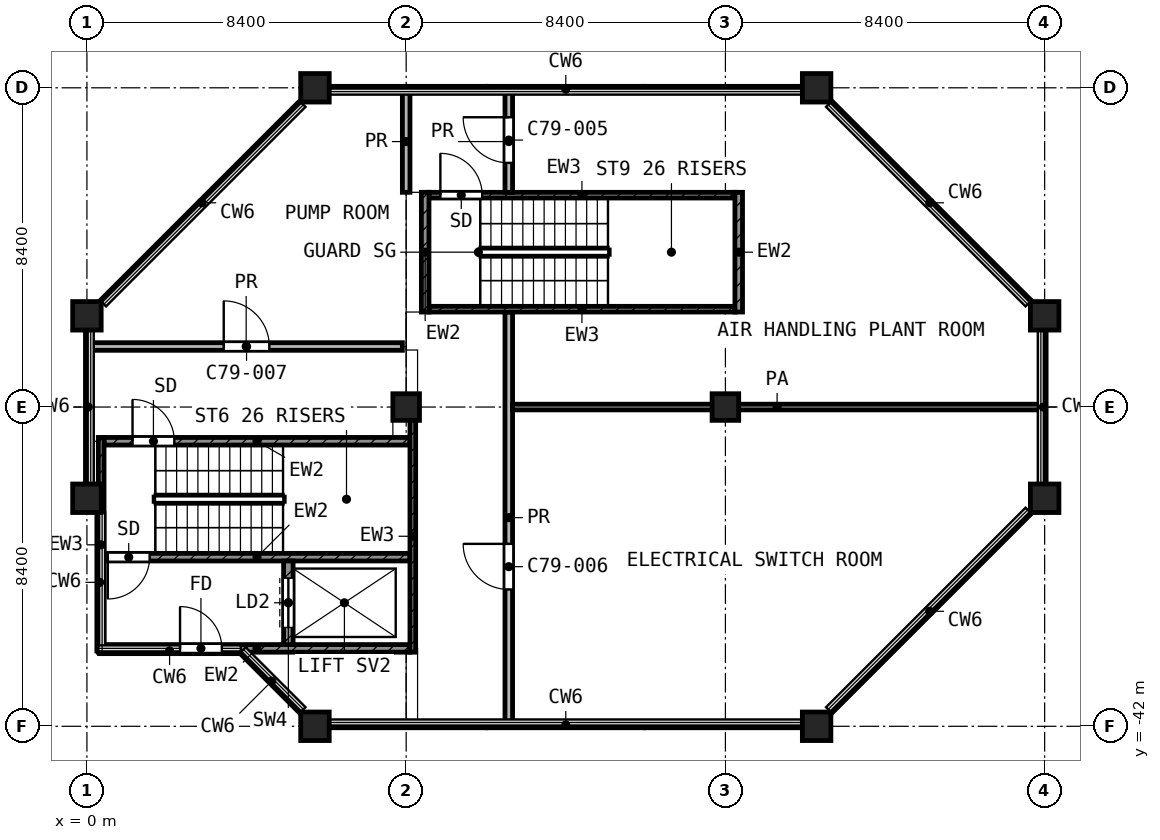
"""IFC4 building model, lengths in metres.
Left out: names, types, materials, properties, quantities, classifications, styles, units other than length and angle.
Written with IfcOpenShell. Run it as: python <this file> out.ifc"""

import sys

from ifc_helpers import new_model, si_unit, direction, frame, frame_2d, origin, origin_2d, place, context, subcontext, project, spatial, rectangle, extrude, element, fill, save


model = new_model("IFC4")
c1 = context("Model", 3, precision=1e-05, world=origin(), true_north=direction((0.0, 1.0)))
c2 = subcontext(c1, "Body", "Model", "MODEL_VIEW")
j1 = project(units=[si_unit("LENGTHUNIT", "METRE"), si_unit("PLANEANGLEUNIT", "RADIAN")], contexts=[c1])
p1 = place(None, origin())
s1 = spatial("IfcSite", under=j1, at=p1, CompositionType="ELEMENT")
p2 = place(p1, origin())
s2 = spatial("IfcBuilding", under=s1, at=p2, CompositionType="ELEMENT")
p3 = place(p2, frame((0.0, 0.0, 341.2)))
s3 = spatial("IfcBuildingStorey", under=s2, at=p3, CompositionType="ELEMENT", Elevation=341.2)
for number, where, z_axis, x_axis in (
    (1, (6.0, -25.2, 0.0), (0.0, 0.0, 1.0), (1.0, 0.0, 0.0)),
    (2, (19.2, -25.2, 0.0), (0.0, 0.0, 1.0), (1.0, 0.0, 0.0)),
    (3, (0.0, -31.2, 0.0), (0.0, 0.0, 1.0), (1.0, 0.0, 0.0)),
    (4, (25.2, -31.2, 0.0), (0.0, 0.0, 1.0), (1.0, 0.0, 0.0)),
):
    element("IfcColumn", number, at=place(p3, frame(where, z_axis=z_axis, x_axis=x_axis)), inside=s3, PredefinedType="COLUMN", context=c2, shape_type="SweptSolid", body=[
        extrude(rectangle(XDim=0.75, YDim=0.75, at=origin_2d()), origin(), (0.0, 0.0, 1.0), 4.5),
    ])
for number, where, z_axis, x_axis in (
    (5, (8.4, -33.6, 0.0), (0.0, 0.0, 1.0), (1.0, 0.0, 0.0)),
    (6, (16.8, -33.6, 0.0), (0.0, 0.0, 1.0), (1.0, 0.0, 0.0)),
):
    element("IfcColumn", number, at=place(p3, frame(where, z_axis=z_axis, x_axis=x_axis)), inside=s3, PredefinedType="COLUMN", context=c2, shape_type="SweptSolid", body=[
        extrude(rectangle(XDim=0.7, YDim=0.7, at=origin_2d()), origin(), (0.0, 0.0, 1.0), 4.5),
    ])
for number, where, z_axis, x_axis in (
    (7, (0.0, -36.0, 0.0), (0.0, 0.0, 1.0), (1.0, 0.0, 0.0)),
    (8, (25.2, -36.0, 0.0), (0.0, 0.0, 1.0), (1.0, 0.0, 0.0)),
    (9, (6.0, -42.0, 0.0), (0.0, 0.0, 1.0), (1.0, 0.0, 0.0)),
    (10, (19.2, -42.0, 0.0), (0.0, 0.0, 1.0), (1.0, 0.0, 0.0)),
):
    element("IfcColumn", number, at=place(p3, frame(where, z_axis=z_axis, x_axis=x_axis)), inside=s3, PredefinedType="COLUMN", context=c2, shape_type="SweptSolid", body=[
        extrude(rectangle(XDim=0.75, YDim=0.75, at=origin_2d()), origin(), (0.0, 0.0, 1.0), 4.5),
    ])
p4 = place(p3, frame((0.375, -40.05, 0.0), z_axis=(0.0, 0.0, 1.0), x_axis=(0.0, 1.0, 0.0)))
e11 = element("IfcWall", 11, at=p4, inside=s3, PredefinedType="SHEAR", context=c2, shape_type="SweptSolid", body=[
    extrude(rectangle(XDim=5.65, YDim=0.15, at=frame_2d((2.825, 0.0))), origin(), (0.0, 0.0, 1.0), 4.2),
])
p5 = place(p3, frame((8.575, -40.05, 0.0), z_axis=(0.0, 0.0, 1.0), x_axis=(0.0, 1.0, 0.0)))
e12 = element("IfcWall", 12, at=p5, inside=s3, PredefinedType="SHEAR", context=c2, shape_type="SweptSolid", body=[
    extrude(rectangle(XDim=6.1, YDim=0.15, at=frame_2d((3.05, 0.0))), origin(), (0.0, 0.0, 1.0), 4.2),
])
p6 = place(p3, frame((0.45, -34.5, 0.0), z_axis=(0.0, 0.0, 1.0), x_axis=(1.0, 0.0, 0.0)))
e13 = element("IfcWall", 13, at=p6, inside=s3, PredefinedType="SHEAR", context=c2, shape_type="SweptSolid", body=[
    extrude(rectangle(XDim=8.05, YDim=0.2, at=frame_2d((4.025, 0.0))), origin(), (0.0, 0.0, 1.0), 4.2),
])
p7 = place(p6, frame((0.75, 0.0, 0.0)))
e14 = element("IfcOpeningElement", 14, at=p7, cuts=e13, PredefinedType="OPENING", context=c2, shape_type="SweptSolid", body=[
    extrude(rectangle(XDim=1.1, YDim=2.1, at=frame_2d((0.55, 1.05))), frame((0.0, 0.11, 0.0), z_axis=(0.0, -1.0, 0.0), x_axis=(1.0, 0.0, 0.0)), (0.0, 0.0, 1.0), 0.22),
])
p8 = place(p3, frame((0.45, -37.55, 0.0), z_axis=(0.0, 0.0, 1.0), x_axis=(1.0, 0.0, 0.0)))
e15 = element("IfcWall", 15, at=p8, inside=s3, PredefinedType="SHEAR", context=c2, shape_type="SweptSolid", body=[
    extrude(rectangle(XDim=8.05, YDim=0.2, at=frame_2d((4.025, 0.0))), origin(), (0.0, 0.0, 1.0), 4.2),
])
p9 = place(p8, frame((0.1, 0.0, 0.0)))
e16 = element("IfcOpeningElement", 16, at=p9, cuts=e15, PredefinedType="OPENING", context=c2, shape_type="SweptSolid", body=[
    extrude(rectangle(XDim=1.1, YDim=2.1, at=frame_2d((0.55, 1.05))), frame((0.0, 0.11, 0.0), z_axis=(0.0, -1.0, 0.0), x_axis=(1.0, 0.0, 0.0)), (0.0, 0.0, 1.0), 0.22),
])
p10 = place(p3, frame((0.45, -39.95, 0.0), z_axis=(0.0, 0.0, 1.0), x_axis=(1.0, 0.0, 0.0)))
e17 = element("IfcWall", 17, at=p10, inside=s3, PredefinedType="SHEAR", context=c2, shape_type="SweptSolid", body=[
    extrude(rectangle(XDim=8.05, YDim=0.2, at=frame_2d((4.025, 0.0))), origin(), (0.0, 0.0, 1.0), 4.2),
])
p11 = place(p10, frame((2.0, 0.0, 0.0)))
e18 = element("IfcOpeningElement", 18, at=p11, cuts=e17, PredefinedType="OPENING", context=c2, shape_type="SweptSolid", body=[
    extrude(rectangle(XDim=1.1, YDim=2.1, at=frame_2d((0.55, 1.05))), frame((0.0, 0.11, 0.0), z_axis=(0.0, -1.0, 0.0), x_axis=(1.0, 0.0, 0.0)), (0.0, 0.0, 1.0), 0.22),
])
p12 = place(p3, frame((5.3, -39.85, 0.0), z_axis=(0.0, 0.0, 1.0), x_axis=(0.0, 1.0, 0.0)))
e19 = element("IfcWall", 19, at=p12, inside=s3, PredefinedType="SHEAR", context=c2, shape_type="SweptSolid", body=[
    extrude(rectangle(XDim=2.2, YDim=0.25, at=frame_2d((1.1, 0.0))), origin(), (0.0, 0.0, 1.0), 4.2),
])
p13 = place(p12, frame((0.45, 0.0, 0.0)))
e20 = element("IfcOpeningElement", 20, at=p13, cuts=e19, PredefinedType="OPENING", context=c2, shape_type="SweptSolid", body=[
    extrude(rectangle(XDim=1.3, YDim=2.1, at=frame_2d((0.65, 1.05))), frame((0.0, 0.135, 0.0), z_axis=(0.0, -1.0, 0.0), x_axis=(1.0, 0.0, 0.0)), (0.0, 0.0, 1.0), 0.27),
])
for number, where, z_axis, x_axis in (
    (21, (8.9, -31.1, 0.0), (0.0, 0.0, 1.0), (0.0, 1.0, 0.0)),
    (22, (17.15, -31.1, 0.0), (0.0, 0.0, 1.0), (0.0, 1.0, 0.0)),
):
    element("IfcWall", number, at=place(p3, frame(where, z_axis=z_axis, x_axis=x_axis)), inside=s3, PredefinedType="SHEAR", context=c2, shape_type="SweptSolid", body=[
        extrude(rectangle(XDim=3.15, YDim=0.2, at=frame_2d((1.575, 0.0))), origin(), (0.0, 0.0, 1.0), 4.2),
    ])
p14 = place(p3, frame((9.0, -28.025, 0.0), z_axis=(0.0, 0.0, 1.0), x_axis=(1.0, 0.0, 0.0)))
e23 = element("IfcWall", 23, at=p14, inside=s3, PredefinedType="SHEAR", context=c2, shape_type="SweptSolid", body=[
    extrude(rectangle(XDim=8.05, YDim=0.15, at=frame_2d((4.025, 0.0))), origin(), (0.0, 0.0, 1.0), 4.2),
])
p15 = place(p14, frame((0.3, 0.0, 0.0)))
e24 = element("IfcOpeningElement", 24, at=p15, cuts=e23, PredefinedType="OPENING", context=c2, shape_type="SweptSolid", body=[
    extrude(rectangle(XDim=1.1, YDim=2.1, at=frame_2d((0.55, 1.05))), frame((0.0, 0.085, 0.0), z_axis=(0.0, -1.0, 0.0), x_axis=(1.0, 0.0, 0.0)), (0.0, 0.0, 1.0), 0.17),
])
p16 = place(p3, frame((9.0, -31.025, 0.0), z_axis=(0.0, 0.0, 1.0), x_axis=(1.0, 0.0, 0.0)))
e25 = element("IfcWall", 25, at=p16, inside=s3, PredefinedType="SHEAR", context=c2, shape_type="SweptSolid", body=[
    extrude(rectangle(XDim=8.05, YDim=0.15, at=frame_2d((4.025, 0.0))), origin(), (0.0, 0.0, 1.0), 4.2),
])
p17 = place(p3, frame((11.2, -33.6, 0.0), z_axis=(0.0, 0.0, 1.0), x_axis=(1.0, 0.0, 0.0)))
e26 = element("IfcWall", 26, at=p17, inside=s3, PredefinedType="PARTITIONING", context=c2, shape_type="SweptSolid", body=[
    extrude(rectangle(XDim=13.92, YDim=0.15, at=frame_2d((6.96, 0.0))), origin(), (0.0, 0.0, 1.0), 4.2),
])
p18 = place(p3, frame((0.08, -32.007, 0.0), z_axis=(0.0, 0.0, 1.0), x_axis=(1.0, 0.0, 0.0)))
e27 = element("IfcWall", 27, at=p18, inside=s3, PredefinedType="PARTITIONING", context=c2, shape_type="SweptSolid", body=[
    extrude(rectangle(XDim=8.22, YDim=0.2, at=frame_2d((4.11, 0.0))), origin(), (0.0, 0.0, 1.0), 4.2),
])
p19 = place(p18, frame((3.52, 0.0, 0.0)))
e28 = element("IfcOpeningElement", 28, at=p19, cuts=e27, PredefinedType="OPENING", context=c2, shape_type="SweptSolid", body=[
    extrude(rectangle(XDim=1.2, YDim=2.1, at=frame_2d((0.6, 1.05))), frame((0.0, 0.11, 0.0), z_axis=(0.0, -1.0, 0.0), x_axis=(1.0, 0.0, 0.0)), (0.0, 0.0, 1.0), 0.22),
])
p20 = place(p3, frame((8.4, -27.95, 0.0), z_axis=(0.0, 0.0, 1.0), x_axis=(0.0, 1.0, 0.0)))
e29 = element("IfcWall", 29, at=p20, inside=s3, PredefinedType="PARTITIONING", context=c2, shape_type="SweptSolid", body=[
    extrude(rectangle(XDim=2.67, YDim=0.2, at=frame_2d((1.335, 0.0))), origin(), (0.0, 0.0, 1.0), 4.2),
])
p21 = place(p3, frame((11.1, -41.92, 0.0), z_axis=(0.0, 0.0, 1.0), x_axis=(0.0, 1.0, 0.0)))
e30 = element("IfcWall", 30, at=p21, inside=s3, PredefinedType="PARTITIONING", context=c2, shape_type="SweptSolid", body=[
    extrude(rectangle(XDim=10.82, YDim=0.2, at=frame_2d((5.41, 0.0))), origin(), (0.0, 0.0, 1.0), 4.2),
])
p22 = place(p21, frame((3.52, 0.0, 0.0)))
e31 = element("IfcOpeningElement", 31, at=p22, cuts=e30, PredefinedType="OPENING", context=c2, shape_type="SweptSolid", body=[
    extrude(rectangle(XDim=1.2, YDim=2.1, at=frame_2d((0.6, 1.05))), frame((0.0, 0.11, 0.0), z_axis=(0.0, -1.0, 0.0), x_axis=(1.0, 0.0, 0.0)), (0.0, 0.0, 1.0), 0.22),
])
p23 = place(p3, frame((11.1, -27.95, 0.0), z_axis=(0.0, 0.0, 1.0), x_axis=(0.0, 1.0, 0.0)))
e32 = element("IfcWall", 32, at=p23, inside=s3, PredefinedType="PARTITIONING", context=c2, shape_type="SweptSolid", body=[
    extrude(rectangle(XDim=2.67, YDim=0.2, at=frame_2d((1.335, 0.0))), origin(), (0.0, 0.0, 1.0), 4.2),
])
p24 = place(p23, frame((0.775, 0.0, 0.0)))
e33 = element("IfcOpeningElement", 33, at=p24, cuts=e32, PredefinedType="OPENING", context=c2, shape_type="SweptSolid", body=[
    extrude(rectangle(XDim=1.2, YDim=2.1, at=frame_2d((0.6, 1.05))), frame((0.0, 0.11, 0.0), z_axis=(0.0, -1.0, 0.0), x_axis=(1.0, 0.0, 0.0)), (0.0, 0.0, 1.0), 0.22),
])
p25 = place(p7, origin())
e34 = element("IfcDoor", 34, at=p25, inside=s3, OperationType="SINGLE_SWING_LEFT", PredefinedType="DOOR", context=c2, shape_type="SweptSolid", body=[
    extrude(rectangle(XDim=1.1, YDim=2.1, at=frame_2d((0.55, 1.05))), frame((0.0, 0.025, 0.0), z_axis=(0.0, -1.0, 0.0), x_axis=(1.0, 0.0, 0.0)), (0.0, 0.0, 1.0), 0.05),
])
fill(e14, e34)
p26 = place(p9, frame((1.1, 0.0, 0.0), z_axis=(0.0, 0.0, 1.0), x_axis=(-1.0, 0.0, 0.0)))
e35 = element("IfcDoor", 35, at=p26, inside=s3, OperationType="SINGLE_SWING_LEFT", PredefinedType="DOOR", context=c2, shape_type="SweptSolid", body=[
    extrude(rectangle(XDim=1.1, YDim=2.1, at=frame_2d((0.55, 1.05))), frame((0.0, 0.025, 0.0), z_axis=(0.0, -1.0, 0.0), x_axis=(1.0, 0.0, 0.0)), (0.0, 0.0, 1.0), 0.05),
])
fill(e16, e35)
p27 = place(p13, origin())
e36 = element("IfcDoor", 36, at=p27, inside=s3, OperationType="DOUBLE_DOOR_SLIDING", PredefinedType="DOOR", context=c2, shape_type="SweptSolid", body=[
    extrude(rectangle(XDim=1.3, YDim=2.1, at=frame_2d((0.65, 1.05))), frame((0.0, 0.025, 0.0), z_axis=(0.0, -1.0, 0.0), x_axis=(1.0, 0.0, 0.0)), (0.0, 0.0, 1.0), 0.05),
])
fill(e20, e36)
p28 = place(p11, origin())
e37 = element("IfcDoor", 37, at=p28, inside=s3, OperationType="SINGLE_SWING_LEFT", PredefinedType="DOOR", context=c2, shape_type="SweptSolid", body=[
    extrude(rectangle(XDim=1.1, YDim=2.1, at=frame_2d((0.55, 1.05))), frame((0.0, 0.025, 0.0), z_axis=(0.0, -1.0, 0.0), x_axis=(1.0, 0.0, 0.0)), (0.0, 0.0, 1.0), 0.05),
])
fill(e18, e37)
p29 = place(p15, origin())
e38 = element("IfcDoor", 38, at=p29, inside=s3, OperationType="SINGLE_SWING_LEFT", PredefinedType="DOOR", context=c2, shape_type="SweptSolid", body=[
    extrude(rectangle(XDim=1.1, YDim=2.1, at=frame_2d((0.55, 1.05))), frame((0.0, 0.025, 0.0), z_axis=(0.0, -1.0, 0.0), x_axis=(1.0, 0.0, 0.0)), (0.0, 0.0, 1.0), 0.05),
])
fill(e24, e38)
p30 = place(p24, origin())
e39 = element("IfcDoor", 39, at=p30, inside=s3, OperationType="SINGLE_SWING_RIGHT", PredefinedType="DOOR", context=c2, shape_type="SweptSolid", body=[
    extrude(rectangle(XDim=1.2, YDim=2.1, at=frame_2d((0.6, 1.05))), frame((0.0, 0.025, 0.0), z_axis=(0.0, -1.0, 0.0), x_axis=(1.0, 0.0, 0.0)), (0.0, 0.0, 1.0), 0.05),
])
fill(e33, e39)
p31 = place(p22, origin())
e40 = element("IfcDoor", 40, at=p31, inside=s3, OperationType="SINGLE_SWING_RIGHT", PredefinedType="DOOR", context=c2, shape_type="SweptSolid", body=[
    extrude(rectangle(XDim=1.2, YDim=2.1, at=frame_2d((0.6, 1.05))), frame((0.0, 0.025, 0.0), z_axis=(0.0, -1.0, 0.0), x_axis=(1.0, 0.0, 0.0)), (0.0, 0.0, 1.0), 0.05),
])
fill(e31, e40)
p32 = place(p19, origin())
e41 = element("IfcDoor", 41, at=p32, inside=s3, OperationType="SINGLE_SWING_LEFT", PredefinedType="DOOR", context=c2, shape_type="SweptSolid", body=[
    extrude(rectangle(XDim=1.2, YDim=2.1, at=frame_2d((0.6, 1.05))), frame((0.0, 0.025, 0.0), z_axis=(0.0, -1.0, 0.0), x_axis=(1.0, 0.0, 0.0)), (0.0, 0.0, 1.0), 0.05),
])
fill(e28, e41)
save(model, sys.argv[1])
